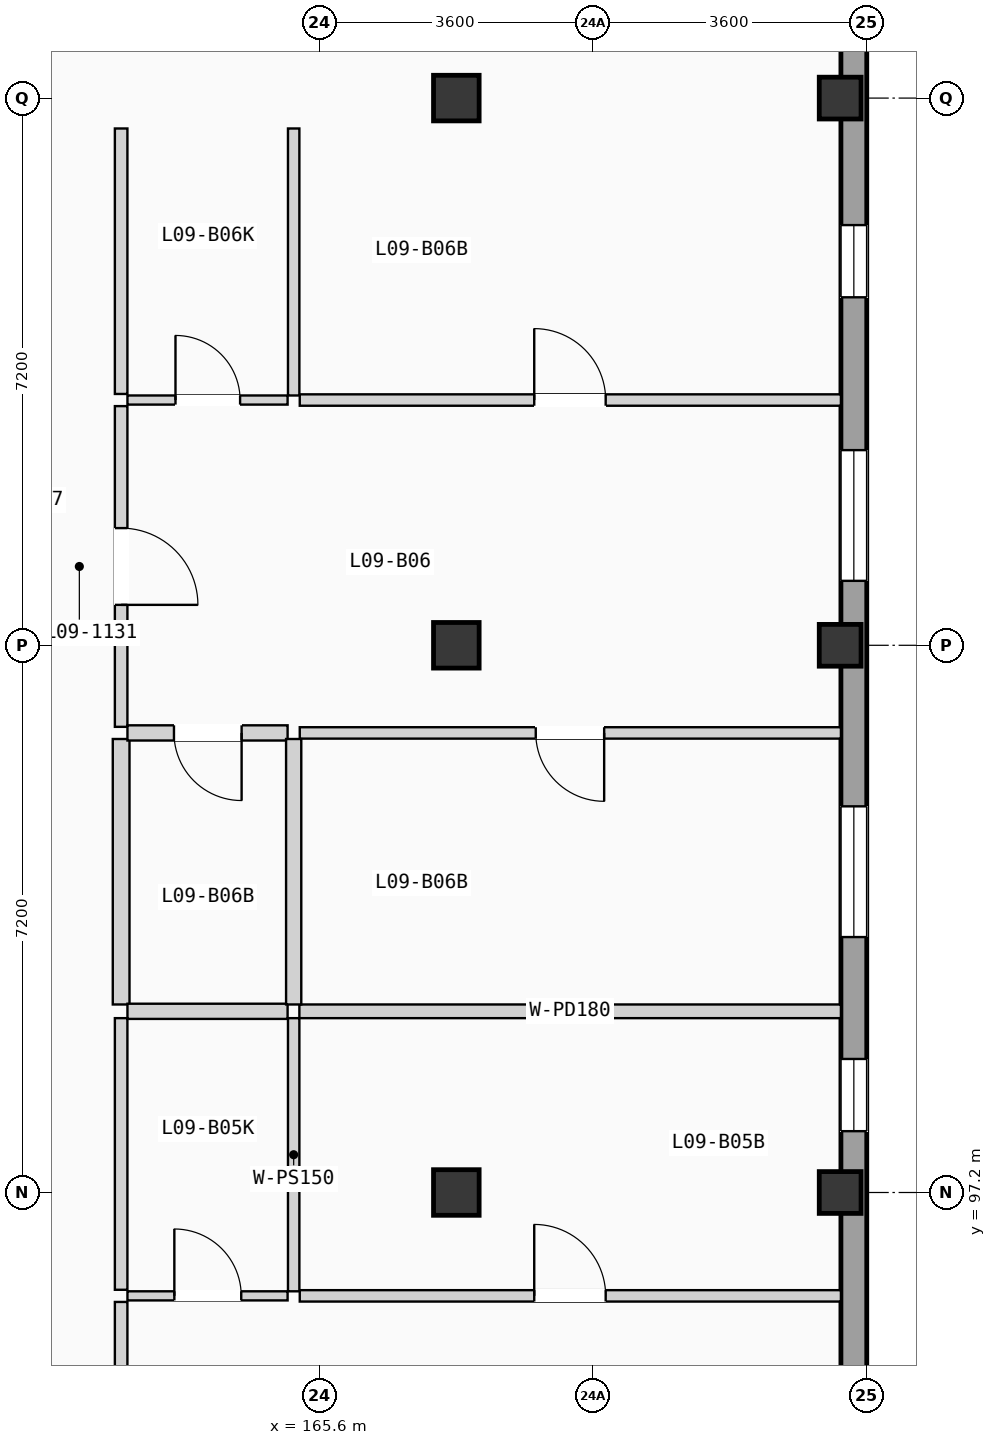
"""IFC4 building model, lengths in metres.
Left out: names, types, materials, properties, quantities, classifications, styles, units other than length and angle.
Written with IfcOpenShell. Run it as: python <this file> out.ifc"""

import sys

from ifc_helpers import new_model, si_unit, direction, frame, frame_2d, origin, origin_2d, place, context, subcontext, project, spatial, rectangle, extrude, element, fill, save


model = new_model("IFC4")
c1 = context("Model", 3, precision=1e-05, world=origin(), true_north=direction((0.0, 1.0)))
c2 = subcontext(c1, "Body", "Model", "MODEL_VIEW")
j1 = project(units=[si_unit("LENGTHUNIT", "METRE"), si_unit("PLANEANGLEUNIT", "RADIAN")], contexts=[c1])
p1 = place(None, origin())
s1 = spatial("IfcSite", under=j1, at=p1, CompositionType="ELEMENT")
p2 = place(p1, origin())
s2 = spatial("IfcBuilding", under=s1, at=p2, CompositionType="ELEMENT")
p3 = place(p2, frame((0.0, 0.0, 30.975)))
s3 = spatial("IfcBuildingStorey", under=s2, at=p3, CompositionType="ELEMENT", Elevation=30.975)
for number, where, z_axis, x_axis in (
    (1, (167.4, 97.2, 0.0), (0.0, 0.0, 1.0), (1.0, 0.0, 0.0)),
    (2, (167.4, 104.4, 0.0), (0.0, 0.0, 1.0), (1.0, 0.0, 0.0)),
    (3, (167.4, 111.6, 0.0), (0.0, 0.0, 1.0), (1.0, 0.0, 0.0)),
):
    element("IfcColumn", number, at=place(p3, frame(where, z_axis=z_axis, x_axis=x_axis)), inside=s3, PredefinedType="COLUMN", context=c2, shape_type="SweptSolid", body=[
        extrude(rectangle(XDim=0.6, YDim=0.6, at=origin_2d()), origin(), (0.0, 0.0, 1.0), 3.15),
    ])
for number, where, z_axis, x_axis in (
    (4, (172.45, 97.2, 0.0), (0.0, 0.0, 1.0), (1.0, 0.0, 0.0)),
    (5, (172.45, 104.4, 0.0), (0.0, 0.0, 1.0), (1.0, 0.0, 0.0)),
    (6, (172.45, 111.6, 0.0), (0.0, 0.0, 1.0), (1.0, 0.0, 0.0)),
):
    element("IfcColumn", number, at=place(p3, frame(where, z_axis=z_axis, x_axis=x_axis)), inside=s3, PredefinedType="COLUMN", context=c2, shape_type="SweptSolid", body=[
        extrude(rectangle(XDim=0.55, YDim=0.55, at=origin_2d()), origin(), (0.0, 0.0, 1.0), 3.15),
    ])
p4 = place(p3, frame((172.63, 68.74, 0.0), z_axis=(0.0, 0.0, 1.0), x_axis=(0.0, 1.0, 0.0)))
e7 = element("IfcWall", 7, at=p4, inside=s3, PredefinedType="SOLIDWALL", context=c2, shape_type="SweptSolid", body=[
    extrude(rectangle(XDim=49.72, YDim=0.34, at=frame_2d((24.86, 0.0))), origin(), (0.0, 0.0, 1.0), 2.9),
])
p5 = place(p4, frame((9.297, 0.0, 0.715)))
e8 = element("IfcOpeningElement", 8, at=p5, cuts=e7, PredefinedType="OPENING", context=c2, shape_type="SweptSolid", body=[
    extrude(rectangle(XDim=1.6, YDim=1.5, at=frame_2d((0.8, 0.75))), frame((0.0, 0.18, 0.0), z_axis=(0.0, -1.0, 0.0), x_axis=(1.0, 0.0, 0.0)), (0.0, 0.0, 1.0), 0.36),
])
p6 = place(p4, frame((15.758, 0.0, 0.565)))
e9 = element("IfcOpeningElement", 9, at=p6, cuts=e7, PredefinedType="OPENING", context=c2, shape_type="SweptSolid", body=[
    extrude(rectangle(XDim=1.6, YDim=1.65, at=frame_2d((0.8, 0.825))), frame((0.0, 0.18, 0.0), z_axis=(0.0, -1.0, 0.0), x_axis=(1.0, 0.0, 0.0)), (0.0, 0.0, 1.0), 0.36),
])
p7 = place(p4, frame((24.385, 0.0, 0.85)))
e10 = element("IfcOpeningElement", 10, at=p7, cuts=e7, PredefinedType="OPENING", context=c2, shape_type="SweptSolid", body=[
    extrude(rectangle(XDim=0.95, YDim=1.2, at=frame_2d((0.475, 0.6))), frame((0.0, 0.18, 0.0), z_axis=(0.0, -1.0, 0.0), x_axis=(1.0, 0.0, 0.0)), (0.0, 0.0, 1.0), 0.36),
])
p8 = place(p4, frame((19.503, 0.0, 0.85)))
e11 = element("IfcOpeningElement", 11, at=p8, cuts=e7, PredefinedType="OPENING", context=c2, shape_type="SweptSolid", body=[
    extrude(rectangle(XDim=0.95, YDim=1.2, at=frame_2d((0.475, 0.6))), frame((0.0, 0.18, 0.0), z_axis=(0.0, -1.0, 0.0), x_axis=(1.0, 0.0, 0.0)), (0.0, 0.0, 1.0), 0.36),
])
p9 = place(p4, frame((29.267, 0.0, 0.85)))
e12 = element("IfcOpeningElement", 12, at=p9, cuts=e7, PredefinedType="OPENING", context=c2, shape_type="SweptSolid", body=[
    extrude(rectangle(XDim=0.95, YDim=1.2, at=frame_2d((0.475, 0.6))), frame((0.0, 0.18, 0.0), z_axis=(0.0, -1.0, 0.0), x_axis=(1.0, 0.0, 0.0)), (0.0, 0.0, 1.0), 0.36),
])
p10 = place(p4, frame((36.508, 0.0, 0.715)))
e13 = element("IfcOpeningElement", 13, at=p10, cuts=e7, PredefinedType="OPENING", context=c2, shape_type="SweptSolid", body=[
    extrude(rectangle(XDim=1.72, YDim=1.5, at=frame_2d((0.86, 0.75))), frame((0.0, 0.18, 0.0), z_axis=(0.0, -1.0, 0.0), x_axis=(1.0, 0.0, 0.0)), (0.0, 0.0, 1.0), 0.36),
])
p11 = place(p4, frame((31.821, 0.0, 0.565)))
e14 = element("IfcOpeningElement", 14, at=p11, cuts=e7, PredefinedType="OPENING", context=c2, shape_type="SweptSolid", body=[
    extrude(rectangle(XDim=1.72, YDim=1.65, at=frame_2d((0.86, 0.825))), frame((0.0, 0.18, 0.0), z_axis=(0.0, -1.0, 0.0), x_axis=(1.0, 0.0, 0.0)), (0.0, 0.0, 1.0), 0.36),
])
p12 = place(p4, frame((40.239, 0.0, 0.85)))
e15 = element("IfcOpeningElement", 15, at=p12, cuts=e7, PredefinedType="OPENING", context=c2, shape_type="SweptSolid", body=[
    extrude(rectangle(XDim=0.95, YDim=1.2, at=frame_2d((0.475, 0.6))), frame((0.0, 0.18, 0.0), z_axis=(0.0, -1.0, 0.0), x_axis=(1.0, 0.0, 0.0)), (0.0, 0.0, 1.0), 0.36),
])
p13 = place(p3, frame((162.99, 91.44, 0.0), z_axis=(0.0, 0.0, 1.0), x_axis=(0.0, 1.0, 0.0)))
e16 = element("IfcWall", 16, at=p13, inside=s3, PredefinedType="PARTITIONING", context=c2, shape_type="SweptSolid", body=[
    extrude(rectangle(XDim=4.32, YDim=0.165, at=frame_2d((2.16, 0.0))), origin(), (0.0, 0.0, 1.0), 2.87),
])
p14 = place(p13, frame((1.655, 0.0, 0.0)))
e17 = element("IfcOpeningElement", 17, at=p14, cuts=e16, PredefinedType="OPENING", context=c2, shape_type="SweptSolid", body=[
    extrude(rectangle(XDim=1.01, YDim=2.11, at=frame_2d((0.505, 1.055))), frame((0.0, 0.093, 0.0), z_axis=(0.0, -1.0, 0.0), x_axis=(1.0, 0.0, 0.0)), (0.0, 0.0, 1.0), 0.185),
])
p15 = place(p3, frame((162.99, 95.92, 0.0), z_axis=(0.0, 0.0, 1.0), x_axis=(0.0, 1.0, 0.0)))
e18 = element("IfcWall", 18, at=p15, inside=s3, PredefinedType="PARTITIONING", context=c2, shape_type="SweptSolid", body=[
    extrude(rectangle(XDim=3.574, YDim=0.165, at=frame_2d((1.787, 0.0))), origin(), (0.0, 0.0, 1.0), 2.87),
])
p16 = place(p3, frame((162.99, 103.327, 0.0), z_axis=(0.0, 0.0, 1.0), x_axis=(0.0, 1.0, 0.0)))
e19 = element("IfcWall", 19, at=p16, inside=s3, PredefinedType="PARTITIONING", context=c2, shape_type="SweptSolid", body=[
    extrude(rectangle(XDim=4.22, YDim=0.165, at=frame_2d((2.11, 0.0))), origin(), (0.0, 0.0, 1.0), 2.87),
])
p17 = place(p16, frame((1.605, 0.0, 0.0)))
e20 = element("IfcOpeningElement", 20, at=p17, cuts=e19, PredefinedType="OPENING", context=c2, shape_type="SweptSolid", body=[
    extrude(rectangle(XDim=1.01, YDim=2.11, at=frame_2d((0.505, 1.055))), frame((0.0, 0.093, 0.0), z_axis=(0.0, -1.0, 0.0), x_axis=(1.0, 0.0, 0.0)), (0.0, 0.0, 1.0), 0.185),
])
p18 = place(p3, frame((162.99, 99.674, 0.0), z_axis=(0.0, 0.0, 1.0), x_axis=(0.0, 1.0, 0.0)))
e21 = element("IfcWall", 21, at=p18, inside=s3, PredefinedType="PLUMBINGWALL", context=c2, shape_type="SweptSolid", body=[
    extrude(rectangle(XDim=3.493, YDim=0.22, at=frame_2d((1.747, 0.0))), origin(), (0.0, 0.0, 1.0), 2.87),
])
p19 = place(p3, frame((162.99, 107.707, 0.0), z_axis=(0.0, 0.0, 1.0), x_axis=(0.0, 1.0, 0.0)))
e22 = element("IfcWall", 22, at=p19, inside=s3, PredefinedType="PARTITIONING", context=c2, shape_type="SweptSolid", body=[
    extrude(rectangle(XDim=3.493, YDim=0.165, at=frame_2d((1.747, 0.0))), origin(), (0.0, 0.0, 1.0), 2.87),
])
p20 = place(p3, frame((163.073, 95.84, 0.0), z_axis=(0.0, 0.0, 1.0), x_axis=(1.0, 0.0, 0.0)))
e23 = element("IfcWall", 23, at=p20, inside=s3, PredefinedType="PARTITIONING", context=c2, shape_type="SweptSolid", body=[
    extrude(rectangle(XDim=2.107, YDim=0.12, at=frame_2d((1.053, 0.0))), origin(), (0.0, 0.0, 1.0), 2.87),
])
p21 = place(p20, frame((0.617, 0.0, 0.0)))
e24 = element("IfcOpeningElement", 24, at=p21, cuts=e23, PredefinedType="OPENING", context=c2, shape_type="SweptSolid", body=[
    extrude(rectangle(XDim=0.88, YDim=2.02, at=frame_2d((0.44, 1.01))), frame((0.0, 0.07, 0.0), z_axis=(0.0, -1.0, 0.0), x_axis=(1.0, 0.0, 0.0)), (0.0, 0.0, 1.0), 0.14),
])
p22 = place(p3, frame((165.34, 95.84, 0.0), z_axis=(0.0, 0.0, 1.0), x_axis=(1.0, 0.0, 0.0)))
e25 = element("IfcWall", 25, at=p22, inside=s3, PredefinedType="PARTITIONING", context=c2, shape_type="SweptSolid", body=[
    extrude(rectangle(XDim=7.12, YDim=0.15, at=frame_2d((3.56, 0.0))), origin(), (0.0, 0.0, 1.0), 2.87),
])
p23 = place(p22, frame((3.085, 0.0, 0.0)))
e26 = element("IfcOpeningElement", 26, at=p23, cuts=e25, PredefinedType="OPENING", context=c2, shape_type="SweptSolid", body=[
    extrude(rectangle(XDim=0.94, YDim=2.06, at=frame_2d((0.47, 1.03))), frame((0.0, 0.085, 0.0), z_axis=(0.0, -1.0, 0.0), x_axis=(1.0, 0.0, 0.0)), (0.0, 0.0, 1.0), 0.17),
])
p24 = place(p3, frame((165.26, 95.9, 0.0), z_axis=(0.0, 0.0, 1.0), x_axis=(0.0, 1.0, 0.0)))
e27 = element("IfcWall", 27, at=p24, inside=s3, PredefinedType="PARTITIONING", context=c2, shape_type="SweptSolid", body=[
    extrude(rectangle(XDim=3.594, YDim=0.15, at=frame_2d((1.797, 0.0))), origin(), (0.0, 0.0, 1.0), 2.87),
])
p25 = place(p3, frame((163.073, 99.584, 0.0), z_axis=(0.0, 0.0, 1.0), x_axis=(1.0, 0.0, 0.0)))
e28 = element("IfcWall", 28, at=p25, inside=s3, PredefinedType="PLUMBINGWALL", context=c2, shape_type="SweptSolid", body=[
    extrude(rectangle(XDim=2.107, YDim=0.2, at=frame_2d((1.053, 0.0))), origin(), (0.0, 0.0, 1.0), 2.87),
])
p26 = place(p3, frame((165.335, 99.584, 0.0), z_axis=(0.0, 0.0, 1.0), x_axis=(1.0, 0.0, 0.0)))
e29 = element("IfcWall", 29, at=p26, inside=s3, PredefinedType="PARTITIONING", context=c2, shape_type="SweptSolid", body=[
    extrude(rectangle(XDim=7.125, YDim=0.18, at=frame_2d((3.562, 0.0))), origin(), (0.0, 0.0, 1.0), 2.87),
])
p27 = place(p3, frame((163.073, 103.247, 0.0), z_axis=(0.0, 0.0, 1.0), x_axis=(1.0, 0.0, 0.0)))
e30 = element("IfcWall", 30, at=p27, inside=s3, PredefinedType="PLUMBINGWALL", context=c2, shape_type="SweptSolid", body=[
    extrude(rectangle(XDim=2.107, YDim=0.2, at=frame_2d((1.053, 0.0))), origin(), (0.0, 0.0, 1.0), 2.87),
])
p28 = place(p27, frame((0.612, 0.0, 0.0)))
e31 = element("IfcOpeningElement", 31, at=p28, cuts=e30, PredefinedType="OPENING", context=c2, shape_type="SweptSolid", body=[
    extrude(rectangle(XDim=0.89, YDim=2.03, at=frame_2d((0.445, 1.015))), frame((0.0, 0.11, 0.0), z_axis=(0.0, -1.0, 0.0), x_axis=(1.0, 0.0, 0.0)), (0.0, 0.0, 1.0), 0.22),
])
p29 = place(p3, frame((163.073, 107.627, 0.0), z_axis=(0.0, 0.0, 1.0), x_axis=(1.0, 0.0, 0.0)))
e32 = element("IfcWall", 32, at=p29, inside=s3, PredefinedType="PARTITIONING", context=c2, shape_type="SweptSolid", body=[
    extrude(rectangle(XDim=2.107, YDim=0.12, at=frame_2d((1.053, 0.0))), origin(), (0.0, 0.0, 1.0), 2.87),
])
p30 = place(p29, frame((0.632, 0.0, 0.0)))
e33 = element("IfcOpeningElement", 33, at=p30, cuts=e32, PredefinedType="OPENING", context=c2, shape_type="SweptSolid", body=[
    extrude(rectangle(XDim=0.85, YDim=2.01, at=frame_2d((0.425, 1.005))), frame((0.0, 0.07, 0.0), z_axis=(0.0, -1.0, 0.0), x_axis=(1.0, 0.0, 0.0)), (0.0, 0.0, 1.0), 0.14),
])
p31 = place(p3, frame((165.34, 103.247, 0.0), z_axis=(0.0, 0.0, 1.0), x_axis=(1.0, 0.0, 0.0)))
e34 = element("IfcWall", 34, at=p31, inside=s3, PredefinedType="PARTITIONING", context=c2, shape_type="SweptSolid", body=[
    extrude(rectangle(XDim=7.12, YDim=0.15, at=frame_2d((3.56, 0.0))), origin(), (0.0, 0.0, 1.0), 2.87),
])
p32 = place(p31, frame((3.105, 0.0, 0.0)))
e35 = element("IfcOpeningElement", 35, at=p32, cuts=e34, PredefinedType="OPENING", context=c2, shape_type="SweptSolid", body=[
    extrude(rectangle(XDim=0.9, YDim=2.04, at=frame_2d((0.45, 1.02))), frame((0.0, 0.085, 0.0), z_axis=(0.0, -1.0, 0.0), x_axis=(1.0, 0.0, 0.0)), (0.0, 0.0, 1.0), 0.17),
])
p33 = place(p3, frame((165.34, 107.627, 0.0), z_axis=(0.0, 0.0, 1.0), x_axis=(1.0, 0.0, 0.0)))
e36 = element("IfcWall", 36, at=p33, inside=s3, PredefinedType="PARTITIONING", context=c2, shape_type="SweptSolid", body=[
    extrude(rectangle(XDim=7.12, YDim=0.15, at=frame_2d((3.56, 0.0))), origin(), (0.0, 0.0, 1.0), 2.87),
])
p34 = place(p33, frame((3.085, 0.0, 0.0)))
e37 = element("IfcOpeningElement", 37, at=p34, cuts=e36, PredefinedType="OPENING", context=c2, shape_type="SweptSolid", body=[
    extrude(rectangle(XDim=0.94, YDim=2.06, at=frame_2d((0.47, 1.03))), frame((0.0, 0.085, 0.0), z_axis=(0.0, -1.0, 0.0), x_axis=(1.0, 0.0, 0.0)), (0.0, 0.0, 1.0), 0.17),
])
p35 = place(p3, frame((165.26, 99.674, 0.0), z_axis=(0.0, 0.0, 1.0), x_axis=(0.0, 1.0, 0.0)))
e38 = element("IfcWall", 38, at=p35, inside=s3, PredefinedType="PLUMBINGWALL", context=c2, shape_type="SweptSolid", body=[
    extrude(rectangle(XDim=3.493, YDim=0.2, at=frame_2d((1.747, 0.0))), origin(), (0.0, 0.0, 1.0), 2.87),
])
p36 = place(p3, frame((165.26, 107.687, 0.0), z_axis=(0.0, 0.0, 1.0), x_axis=(0.0, 1.0, 0.0)))
e39 = element("IfcWall", 39, at=p36, inside=s3, PredefinedType="PARTITIONING", context=c2, shape_type="SweptSolid", body=[
    extrude(rectangle(XDim=3.513, YDim=0.15, at=frame_2d((1.756, 0.0))), origin(), (0.0, 0.0, 1.0), 2.87),
])
p37 = place(p9, origin())
e40 = element("IfcWindow", 40, at=p37, inside=s3, PartitioningType="SINGLE_PANEL", PredefinedType="WINDOW", context=c2, shape_type="SweptSolid", body=[
    extrude(rectangle(XDim=0.95, YDim=1.2, at=frame_2d((0.475, 0.6))), frame((0.0, 0.03, 0.0), z_axis=(0.0, -1.0, 0.0), x_axis=(1.0, 0.0, 0.0)), (0.0, 0.0, 1.0), 0.06),
])
fill(e12, e40)
p38 = place(p10, origin())
e41 = element("IfcWindow", 41, at=p38, inside=s3, PartitioningType="DOUBLE_PANEL_VERTICAL", PredefinedType="WINDOW", context=c2, shape_type="SweptSolid", body=[
    extrude(rectangle(XDim=1.72, YDim=1.5, at=frame_2d((0.86, 0.75))), frame((0.0, 0.03, 0.0), z_axis=(0.0, -1.0, 0.0), x_axis=(1.0, 0.0, 0.0)), (0.0, 0.0, 1.0), 0.06),
])
fill(e13, e41)
p39 = place(p11, origin())
e42 = element("IfcWindow", 42, at=p39, inside=s3, PartitioningType="DOUBLE_PANEL_VERTICAL", PredefinedType="WINDOW", context=c2, shape_type="SweptSolid", body=[
    extrude(rectangle(XDim=1.72, YDim=1.65, at=frame_2d((0.86, 0.825))), frame((0.0, 0.03, 0.0), z_axis=(0.0, -1.0, 0.0), x_axis=(1.0, 0.0, 0.0)), (0.0, 0.0, 1.0), 0.06),
])
fill(e14, e42)
p40 = place(p12, origin())
e43 = element("IfcWindow", 43, at=p40, inside=s3, PartitioningType="SINGLE_PANEL", PredefinedType="WINDOW", context=c2, shape_type="SweptSolid", body=[
    extrude(rectangle(XDim=0.95, YDim=1.2, at=frame_2d((0.475, 0.6))), frame((0.0, 0.03, 0.0), z_axis=(0.0, -1.0, 0.0), x_axis=(1.0, 0.0, 0.0)), (0.0, 0.0, 1.0), 0.06),
])
fill(e15, e43)
p41 = place(p17, frame((1.01, 0.0, 0.0), z_axis=(0.0, 0.0, 1.0), x_axis=(-1.0, 0.0, 0.0)))
e44 = element("IfcDoor", 44, at=p41, inside=s3, OperationType="SINGLE_SWING_LEFT", PredefinedType="DOOR", context=c2, shape_type="SweptSolid", body=[
    extrude(rectangle(XDim=1.01, YDim=2.11, at=frame_2d((0.505, 1.055))), frame((0.0, 0.025, 0.0), z_axis=(0.0, -1.0, 0.0), x_axis=(1.0, 0.0, 0.0)), (0.0, 0.0, 1.0), 0.05),
])
fill(e20, e44)
p42 = place(p21, origin())
e45 = element("IfcDoor", 45, at=p42, inside=s3, OperationType="SINGLE_SWING_LEFT", PredefinedType="DOOR", context=c2, shape_type="SweptSolid", body=[
    extrude(rectangle(XDim=0.88, YDim=2.02, at=frame_2d((0.44, 1.01))), frame((0.0, 0.025, 0.0), z_axis=(0.0, -1.0, 0.0), x_axis=(1.0, 0.0, 0.0)), (0.0, 0.0, 1.0), 0.05),
])
fill(e24, e45)
p43 = place(p23, origin())
e46 = element("IfcDoor", 46, at=p43, inside=s3, OperationType="SINGLE_SWING_LEFT", PredefinedType="DOOR", context=c2, shape_type="SweptSolid", body=[
    extrude(rectangle(XDim=0.94, YDim=2.06, at=frame_2d((0.47, 1.03))), frame((0.0, 0.025, 0.0), z_axis=(0.0, -1.0, 0.0), x_axis=(1.0, 0.0, 0.0)), (0.0, 0.0, 1.0), 0.05),
])
fill(e26, e46)
p44 = place(p28, frame((0.89, 0.0, 0.0), z_axis=(0.0, 0.0, 1.0), x_axis=(-1.0, 0.0, 0.0)))
e47 = element("IfcDoor", 47, at=p44, inside=s3, OperationType="SINGLE_SWING_RIGHT", PredefinedType="DOOR", context=c2, shape_type="SweptSolid", body=[
    extrude(rectangle(XDim=0.89, YDim=2.03, at=frame_2d((0.445, 1.015))), frame((0.0, 0.025, 0.0), z_axis=(0.0, -1.0, 0.0), x_axis=(1.0, 0.0, 0.0)), (0.0, 0.0, 1.0), 0.05),
])
fill(e31, e47)
p45 = place(p30, origin())
e48 = element("IfcDoor", 48, at=p45, inside=s3, OperationType="SINGLE_SWING_LEFT", PredefinedType="DOOR", context=c2, shape_type="SweptSolid", body=[
    extrude(rectangle(XDim=0.85, YDim=2.01, at=frame_2d((0.425, 1.005))), frame((0.0, 0.025, 0.0), z_axis=(0.0, -1.0, 0.0), x_axis=(1.0, 0.0, 0.0)), (0.0, 0.0, 1.0), 0.05),
])
fill(e33, e48)
p46 = place(p32, frame((0.9, 0.0, 0.0), z_axis=(0.0, 0.0, 1.0), x_axis=(-1.0, 0.0, 0.0)))
e49 = element("IfcDoor", 49, at=p46, inside=s3, OperationType="SINGLE_SWING_RIGHT", PredefinedType="DOOR", context=c2, shape_type="SweptSolid", body=[
    extrude(rectangle(XDim=0.9, YDim=2.04, at=frame_2d((0.45, 1.02))), frame((0.0, 0.025, 0.0), z_axis=(0.0, -1.0, 0.0), x_axis=(1.0, 0.0, 0.0)), (0.0, 0.0, 1.0), 0.05),
])
fill(e35, e49)
p47 = place(p34, origin())
e50 = element("IfcDoor", 50, at=p47, inside=s3, OperationType="SINGLE_SWING_LEFT", PredefinedType="DOOR", context=c2, shape_type="SweptSolid", body=[
    extrude(rectangle(XDim=0.94, YDim=2.06, at=frame_2d((0.47, 1.03))), frame((0.0, 0.025, 0.0), z_axis=(0.0, -1.0, 0.0), x_axis=(1.0, 0.0, 0.0)), (0.0, 0.0, 1.0), 0.05),
])
fill(e37, e50)
save(model, sys.argv[1])
